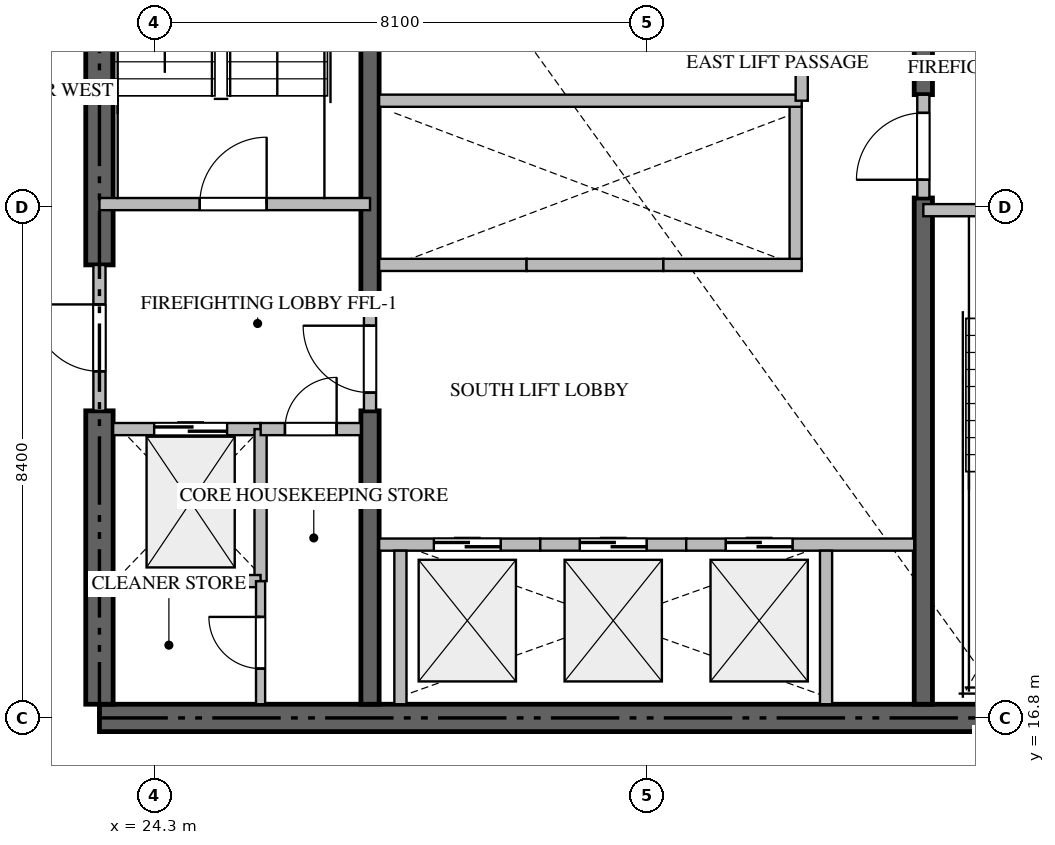
"""IFC4 building model, lengths in metres.
Left out: names, types, materials, properties, quantities, classifications, styles, units other than length and angle.
Written with IfcOpenShell. Run it as: python <this file> out.ifc"""

import sys

from ifc_helpers import new_model, si_unit, direction, frame, frame_2d, origin, place, context, subcontext, project, spatial, rectangle, extrude, source, transform, mapped, element, fill, save


model = new_model("IFC4")
c1 = context("Model", 3, precision=1e-05, world=origin(), true_north=direction((0.0, 1.0)))
c2 = subcontext(c1, "Body", "Model", "MODEL_VIEW")
j1 = project(units=[si_unit("LENGTHUNIT", "METRE"), si_unit("PLANEANGLEUNIT", "RADIAN")], contexts=[c1])
p1 = place(None, origin())
s1 = spatial("IfcSite", under=j1, at=p1, CompositionType="ELEMENT")
p2 = place(p1, origin())
s2 = spatial("IfcBuilding", under=s1, at=p2, CompositionType="ELEMENT")
p3 = place(p2, frame((0.0, 0.0, 67.95)))
s3 = spatial("IfcBuildingStorey", under=s2, at=p3, CompositionType="ELEMENT", Elevation=67.95)
p4 = place(p3, frame((23.4, 16.8, -0.26), z_axis=(0.0, 0.0, 1.0), x_axis=(1.0, 0.0, 0.0)))
e1 = element("IfcWall", 1, at=p4, inside=s3, PredefinedType="SHEAR", context=c2, shape_type="SweptSolid", body=[
    extrude(rectangle(XDim=18.0, YDim=0.45, at=frame_2d((9.0, 0.0))), origin(), (0.0, 0.0, 1.0), 3.748),
])
p5 = place(p3, frame((23.4, 17.025, -0.26), z_axis=(0.0, 0.0, 1.0), x_axis=(0.0, 1.0, 0.0)))
e2 = element("IfcWall", 2, at=p5, inside=s3, PredefinedType="SHEAR", context=c2, shape_type="SweptSolid", body=[
    extrude(rectangle(XDim=4.825, YDim=0.45, at=frame_2d((2.413, 0.0))), origin(), (0.0, 0.0, 1.0), 3.748),
])
p6 = place(p3, frame((23.4, 24.25, -0.26), z_axis=(0.0, 0.0, 1.0), x_axis=(0.0, 1.0, 0.0)))
e3 = element("IfcWall", 3, at=p6, inside=s3, PredefinedType="SHEAR", context=c2, shape_type="SweptSolid", body=[
    extrude(rectangle(XDim=9.125, YDim=0.45, at=frame_2d((4.562, 0.0))), origin(), (0.0, 0.0, 1.0), 3.748),
])
p7 = place(p3, frame((27.85, 17.025, -0.26), z_axis=(0.0, 0.0, 1.0), x_axis=(0.0, 1.0, 0.0)))
e4 = element("IfcWall", 4, at=p7, inside=s3, PredefinedType="SHEAR", context=c2, shape_type="SweptSolid", body=[
    extrude(rectangle(XDim=4.825, YDim=0.3, at=frame_2d((2.413, 0.0))), origin(), (0.0, 0.0, 1.0), 3.748),
])
p8 = place(p3, frame((27.85, 23.55, -0.26), z_axis=(0.0, 0.0, 1.0), x_axis=(0.0, 1.0, 0.0)))
e5 = element("IfcWall", 5, at=p8, inside=s3, PredefinedType="SHEAR", context=c2, shape_type="SweptSolid", body=[
    extrude(rectangle(XDim=9.825, YDim=0.3, at=frame_2d((4.913, 0.0))), origin(), (0.0, 0.0, 1.0), 3.748),
])
p9 = place(p3, frame((36.95, 17.025, -0.26), z_axis=(0.0, 0.0, 1.0), x_axis=(0.0, 1.0, 0.0)))
e6 = element("IfcWall", 6, at=p9, inside=s3, PredefinedType="SHEAR", context=c2, shape_type="SweptSolid", body=[
    extrude(rectangle(XDim=8.325, YDim=0.3, at=frame_2d((4.163, 0.0))), origin(), (0.0, 0.0, 1.0), 3.748),
])
p10 = place(p3, frame((36.95, 27.05, -0.26), z_axis=(0.0, 0.0, 1.0), x_axis=(0.0, 1.0, 0.0)))
e7 = element("IfcWall", 7, at=p10, inside=s3, PredefinedType="SHEAR", context=c2, shape_type="SweptSolid", body=[
    extrude(rectangle(XDim=6.325, YDim=0.3, at=frame_2d((3.163, 0.0))), origin(), (0.0, 0.0, 1.0), 3.748),
])
p11 = place(p3, frame((23.4, 25.25, 0.0), z_axis=(0.0, 0.0, 1.0), x_axis=(1.0, 0.0, 0.0)))
e8 = element("IfcWall", 8, at=p11, inside=s3, PredefinedType="STANDARD", context=c2, shape_type="SweptSolid", body=[
    extrude(rectangle(XDim=4.45, YDim=0.2, at=frame_2d((2.225, 0.0))), origin(), (0.0, 0.0, 1.0), 3.49),
])
p12 = place(p11, frame((1.65, 0.0, 0.0)))
e9 = element("IfcOpeningElement", 9, at=p12, cuts=e8, PredefinedType="OPENING", context=c2, shape_type="SweptSolid", body=[
    extrude(rectangle(XDim=1.1, YDim=2.15, at=frame_2d((0.55, 1.075))), frame((0.0, 0.11, 0.0), z_axis=(0.0, -1.0, 0.0), x_axis=(1.0, 0.0, 0.0)), (0.0, 0.0, 1.0), 0.22),
])
p13 = place(p3, frame((36.95, 25.15, 0.0), z_axis=(0.0, 0.0, 1.0), x_axis=(1.0, 0.0, 0.0)))
e10 = element("IfcWall", 10, at=p13, inside=s3, PredefinedType="STANDARD", context=c2, shape_type="SweptSolid", body=[
    extrude(rectangle(XDim=4.45, YDim=0.2, at=frame_2d((2.225, 0.0))), origin(), (0.0, 0.0, 1.0), 3.49),
])
p14 = place(p13, frame((1.65, 0.0, 0.0)))
e11 = element("IfcOpeningElement", 11, at=p14, cuts=e10, PredefinedType="OPENING", context=c2, shape_type="SweptSolid", body=[
    extrude(rectangle(XDim=1.1, YDim=2.15, at=frame_2d((0.55, 1.075))), frame((0.0, 0.11, 0.0), z_axis=(0.0, -1.0, 0.0), x_axis=(1.0, 0.0, 0.0)), (0.0, 0.0, 1.0), 0.22),
])
p15 = place(p3, frame((23.625, 21.55, 0.0), z_axis=(0.0, 0.0, 1.0), x_axis=(1.0, 0.0, 0.0)))
e12 = element("IfcWall", 12, at=p15, inside=s3, PredefinedType="STANDARD", context=c2, shape_type="SweptSolid", body=[
    extrude(rectangle(XDim=2.425, YDim=0.2, at=frame_2d((1.212, 0.0))), origin(), (0.0, 0.0, 1.0), 3.49),
])
p16 = place(p15, frame((0.675, 0.0, 0.0)))
e13 = element("IfcOpeningElement", 13, at=p16, cuts=e12, PredefinedType="OPENING", context=c2, shape_type="SweptSolid", body=[
    extrude(rectangle(XDim=1.2, YDim=2.2, at=frame_2d((0.6, 1.1))), frame((0.0, 0.11, 0.0), z_axis=(0.0, -1.0, 0.0), x_axis=(1.0, 0.0, 0.0)), (0.0, 0.0, 1.0), 0.22),
])
p17 = place(p3, frame((28.0, 19.65, 0.0), z_axis=(0.0, 0.0, 1.0), x_axis=(1.0, 0.0, 0.0)))
e14 = element("IfcWall", 14, at=p17, inside=s3, PredefinedType="STANDARD", context=c2, shape_type="SweptSolid", body=[
    extrude(rectangle(XDim=2.65, YDim=0.2, at=frame_2d((1.325, 0.0))), origin(), (0.0, 0.0, 1.0), 3.49),
])
p18 = place(p17, frame((0.9, 0.0, 0.0)))
e15 = element("IfcOpeningElement", 15, at=p18, cuts=e14, PredefinedType="OPENING", context=c2, shape_type="SweptSolid", body=[
    extrude(rectangle(XDim=1.1, YDim=2.2, at=frame_2d((0.55, 1.1))), frame((0.0, 0.11, 0.0), z_axis=(0.0, -1.0, 0.0), x_axis=(1.0, 0.0, 0.0)), (0.0, 0.0, 1.0), 0.22),
])
p19 = place(p3, frame((28.35, 17.025, 0.0), z_axis=(0.0, 0.0, 1.0), x_axis=(0.0, 1.0, 0.0)))
e16 = element("IfcWall", 16, at=p19, inside=s3, PredefinedType="STANDARD", context=c2, shape_type="SweptSolid", body=[
    extrude(rectangle(XDim=2.525, YDim=0.2, at=frame_2d((1.263, 0.0))), origin(), (0.0, 0.0, 1.0), 3.49),
])
p20 = place(p3, frame((30.65, 19.65, 0.0), z_axis=(0.0, 0.0, 1.0), x_axis=(1.0, 0.0, 0.0)))
e17 = element("IfcWall", 17, at=p20, inside=s3, PredefinedType="STANDARD", context=c2, shape_type="SweptSolid", body=[
    extrude(rectangle(XDim=2.4, YDim=0.2, at=frame_2d((1.2, 0.0))), origin(), (0.0, 0.0, 1.0), 3.49),
])
p21 = place(p20, frame((0.65, 0.0, 0.0)))
e18 = element("IfcOpeningElement", 18, at=p21, cuts=e17, PredefinedType="OPENING", context=c2, shape_type="SweptSolid", body=[
    extrude(rectangle(XDim=1.1, YDim=2.2, at=frame_2d((0.55, 1.1))), frame((0.0, 0.11, 0.0), z_axis=(0.0, -1.0, 0.0), x_axis=(1.0, 0.0, 0.0)), (0.0, 0.0, 1.0), 0.22),
])
p22 = place(p3, frame((33.05, 19.65, 0.0), z_axis=(0.0, 0.0, 1.0), x_axis=(1.0, 0.0, 0.0)))
e19 = element("IfcWall", 19, at=p22, inside=s3, PredefinedType="STANDARD", context=c2, shape_type="SweptSolid", body=[
    extrude(rectangle(XDim=3.75, YDim=0.2, at=frame_2d((1.875, 0.0))), origin(), (0.0, 0.0, 1.0), 3.49),
])
p23 = place(p22, frame((0.65, 0.0, 0.0)))
e20 = element("IfcOpeningElement", 20, at=p23, cuts=e19, PredefinedType="OPENING", context=c2, shape_type="SweptSolid", body=[
    extrude(rectangle(XDim=1.1, YDim=2.2, at=frame_2d((0.55, 1.1))), frame((0.0, 0.11, 0.0), z_axis=(0.0, -1.0, 0.0), x_axis=(1.0, 0.0, 0.0)), (0.0, 0.0, 1.0), 0.22),
])
p24 = place(p3, frame((35.35, 17.025, 0.0), z_axis=(0.0, 0.0, 1.0), x_axis=(0.0, 1.0, 0.0)))
e21 = element("IfcWall", 21, at=p24, inside=s3, PredefinedType="STANDARD", context=c2, shape_type="SweptSolid", body=[
    extrude(rectangle(XDim=2.525, YDim=0.2, at=frame_2d((1.263, 0.0))), origin(), (0.0, 0.0, 1.0), 3.49),
])
p25 = place(p3, frame((28.0, 24.25, 0.0), z_axis=(0.0, 0.0, 1.0), x_axis=(1.0, 0.0, 0.0)))
e22 = element("IfcWall", 22, at=p25, inside=s3, PredefinedType="STANDARD", context=c2, shape_type="SweptSolid", body=[
    extrude(rectangle(XDim=2.425, YDim=0.2, at=frame_2d((1.212, 0.0))), origin(), (0.0, 0.0, 1.0), 3.49),
])
p26 = place(p3, frame((30.425, 24.25, 0.0), z_axis=(0.0, 0.0, 1.0), x_axis=(1.0, 0.0, 0.0)))
e23 = element("IfcWall", 23, at=p26, inside=s3, PredefinedType="STANDARD", context=c2, shape_type="SweptSolid", body=[
    extrude(rectangle(XDim=2.25, YDim=0.2, at=frame_2d((1.125, 0.0))), origin(), (0.0, 0.0, 1.0), 3.49),
])
p27 = place(p3, frame((32.675, 24.25, 0.0), z_axis=(0.0, 0.0, 1.0), x_axis=(1.0, 0.0, 0.0)))
e24 = element("IfcWall", 24, at=p27, inside=s3, PredefinedType="STANDARD", context=c2, shape_type="SweptSolid", body=[
    extrude(rectangle(XDim=2.275, YDim=0.2, at=frame_2d((1.137, 0.0))), origin(), (0.0, 0.0, 1.0), 3.49),
])
for number, where, z_axis, x_axis in (
    (25, (34.85, 24.35, 0.0), (0.0, 0.0, 1.0), (0.0, 1.0, 0.0)),
    (26, (26.05, 19.05, 0.0), (0.0, 0.0, 1.0), (0.0, 1.0, 0.0)),
):
    element("IfcWall", number, at=place(p3, frame(where, z_axis=z_axis, x_axis=x_axis)), inside=s3, PredefinedType="STANDARD", context=c2, shape_type="SweptSolid", body=[
        extrude(rectangle(XDim=2.5, YDim=0.2, at=frame_2d((1.25, 0.0))), origin(), (0.0, 0.0, 1.0), 3.49),
    ])
p28 = place(p3, frame((23.625, 19.05, 0.0), z_axis=(0.0, 0.0, 1.0), x_axis=(1.0, 0.0, 0.0)))
e27 = element("IfcWall", 27, at=p28, inside=s3, PredefinedType="STANDARD", context=c2, shape_type="SweptSolid", body=[
    extrude(rectangle(XDim=2.425, YDim=0.2, at=frame_2d((1.212, 0.0))), origin(), (0.0, 0.0, 1.0), 3.49),
])
p29 = place(p3, frame((26.052, 21.55, 0.0), z_axis=(0.0, 0.0, 1.0), x_axis=(1.0, 0.0, 0.0)))
e28 = element("IfcWall", 28, at=p29, inside=s3, PredefinedType="STANDARD", context=c2, shape_type="SweptSolid", body=[
    extrude(rectangle(XDim=1.648, YDim=0.2, at=frame_2d((0.824, 0.0))), origin(), (0.0, 0.0, 1.0), 3.49),
])
p30 = place(p29, frame((0.399, 0.0, 0.0)))
e29 = element("IfcOpeningElement", 29, at=p30, cuts=e28, PredefinedType="OPENING", context=c2, shape_type="SweptSolid", body=[
    extrude(rectangle(XDim=0.85, YDim=2.1, at=frame_2d((0.425, 1.05))), frame((0.0, 0.11, 0.0), z_axis=(0.0, -1.0, 0.0), x_axis=(1.0, 0.0, 0.0)), (0.0, 0.0, 1.0), 0.22),
])
p31 = place(p3, frame((23.4, 21.852, 0.0), z_axis=(0.0, 0.0, 1.0), x_axis=(0.0, 1.0, 0.0)))
e30 = element("IfcWall", 30, at=p31, inside=s3, PredefinedType="STANDARD", context=c2, shape_type="SweptSolid", body=[
    extrude(rectangle(XDim=2.396, YDim=0.2, at=frame_2d((1.198, 0.0))), origin(), (0.0, 0.0, 1.0), 3.49),
])
p32 = place(p31, frame((0.648, 0.0, 0.0)))
e31 = element("IfcOpeningElement", 31, at=p32, cuts=e30, PredefinedType="OPENING", context=c2, shape_type="SweptSolid", body=[
    extrude(rectangle(XDim=1.1, YDim=2.15, at=frame_2d((0.55, 1.075))), frame((0.0, 0.11, 0.0), z_axis=(0.0, -1.0, 0.0), x_axis=(1.0, 0.0, 0.0)), (0.0, 0.0, 1.0), 0.22),
])
p33 = place(p3, frame((27.85, 21.852, 0.0), z_axis=(0.0, 0.0, 1.0), x_axis=(0.0, 1.0, 0.0)))
e32 = element("IfcWall", 32, at=p33, inside=s3, PredefinedType="STANDARD", context=c2, shape_type="SweptSolid", body=[
    extrude(rectangle(XDim=1.696, YDim=0.2, at=frame_2d((0.848, 0.0))), origin(), (0.0, 0.0, 1.0), 3.49),
])
p34 = place(p33, frame((0.298, 0.0, 0.0)))
e33 = element("IfcOpeningElement", 33, at=p34, cuts=e32, PredefinedType="OPENING", context=c2, shape_type="SweptSolid", body=[
    extrude(rectangle(XDim=1.1, YDim=2.15, at=frame_2d((0.55, 1.075))), frame((0.0, 0.11, 0.0), z_axis=(0.0, -1.0, 0.0), x_axis=(1.0, 0.0, 0.0)), (0.0, 0.0, 1.0), 0.22),
])
p35 = place(p3, frame((36.95, 25.352, 0.0), z_axis=(0.0, 0.0, 1.0), x_axis=(0.0, 1.0, 0.0)))
e34 = element("IfcWall", 34, at=p35, inside=s3, PredefinedType="STANDARD", context=c2, shape_type="SweptSolid", body=[
    extrude(rectangle(XDim=1.696, YDim=0.2, at=frame_2d((0.848, 0.0))), origin(), (0.0, 0.0, 1.0), 3.49),
])
p36 = place(p35, frame((0.298, 0.0, 0.0)))
e35 = element("IfcOpeningElement", 35, at=p36, cuts=e34, PredefinedType="OPENING", context=c2, shape_type="SweptSolid", body=[
    extrude(rectangle(XDim=1.1, YDim=2.15, at=frame_2d((0.55, 1.075))), frame((0.0, 0.11, 0.0), z_axis=(0.0, -1.0, 0.0), x_axis=(1.0, 0.0, 0.0)), (0.0, 0.0, 1.0), 0.22),
])
p37 = place(p3, frame((28.0, 26.95, 0.0), z_axis=(0.0, 0.0, 1.0), x_axis=(1.0, 0.0, 0.0)))
e36 = element("IfcWall", 36, at=p37, inside=s3, PredefinedType="STANDARD", context=c2, shape_type="SweptSolid", body=[
    extrude(rectangle(XDim=6.95, YDim=0.2, at=frame_2d((3.475, 0.0))), origin(), (0.0, 0.0, 1.0), 3.49),
])
p38 = place(p3, frame((26.05, 17.025, 0.0), z_axis=(0.0, 0.0, 1.0), x_axis=(0.0, 1.0, 0.0)))
e37 = element("IfcWall", 37, at=p38, inside=s3, PredefinedType="PARTITIONING", context=c2, shape_type="SweptSolid", body=[
    extrude(rectangle(XDim=2.023, YDim=0.15, at=frame_2d((1.012, 0.0))), origin(), (0.0, 0.0, 1.0), 3.49),
])
p39 = place(p38, frame((0.586, 0.0, 0.0)))
e38 = element("IfcOpeningElement", 38, at=p39, cuts=e37, PredefinedType="OPENING", context=c2, shape_type="SweptSolid", body=[
    extrude(rectangle(XDim=0.85, YDim=2.1, at=frame_2d((0.425, 1.05))), frame((0.0, 0.085, 0.0), z_axis=(0.0, -1.0, 0.0), x_axis=(1.0, 0.0, 0.0)), (0.0, 0.0, 1.0), 0.17),
])
p40 = place(p3, frame((34.95, 26.95, 0.0), z_axis=(0.0, 0.0, 1.0), x_axis=(0.0, 1.0, 0.0)))
e39 = element("IfcWall", 39, at=p40, inside=s3, PredefinedType="STANDARD", context=c2, shape_type="SweptSolid", body=[
    extrude(rectangle(XDim=3.6, YDim=0.2, at=frame_2d((1.8, 0.0))), origin(), (0.0, 0.0, 1.0), 3.49),
])
p41 = place(p40, frame((1.35, 0.0, 0.0)))
e40 = element("IfcOpeningElement", 40, at=p41, cuts=e39, PredefinedType="OPENING", context=c2, shape_type="SweptSolid", body=[
    extrude(rectangle(XDim=0.9, YDim=2.1, at=frame_2d((0.45, 1.05))), frame((0.0, 0.11, 0.0), z_axis=(0.0, -1.0, 0.0), x_axis=(1.0, 0.0, 0.0)), (0.0, 0.0, 1.0), 0.22),
])
m1 = source(origin(), c2, "Body", "SweptSolid", [
    extrude(rectangle(XDim=1.1, YDim=2.15, at=frame_2d((0.55, 1.075))), frame((0.0, 0.025, 0.0), z_axis=(0.0, -1.0, 0.0), x_axis=(1.0, 0.0, 0.0)), (0.0, 0.0, 1.0), 0.05),
])
p42 = place(p12, origin())
e41 = element("IfcDoor", 41, at=p42, inside=s3, OperationType="SINGLE_SWING_RIGHT", PredefinedType="DOOR", context=c2, shape_type="MappedRepresentation", body=[
    mapped(m1, transform((0.0, 0.0, 0.0), scale=1.0)),
])
fill(e9, e41)
m2 = source(origin(), c2, "Body", "SweptSolid", [
    extrude(rectangle(XDim=1.2, YDim=2.2, at=frame_2d((0.6, 1.1))), frame((0.0, 0.025, 0.0), z_axis=(0.0, -1.0, 0.0), x_axis=(1.0, 0.0, 0.0)), (0.0, 0.0, 1.0), 0.05),
])
p43 = place(p16, origin())
e42 = element("IfcDoor", 42, at=p43, inside=s3, OperationType="DOUBLE_DOOR_SLIDING", PredefinedType="DOOR", context=c2, shape_type="MappedRepresentation", body=[
    mapped(m2, transform((0.0, 0.0, 0.0), scale=1.0)),
])
fill(e13, e42)
m3 = source(origin(), c2, "Body", "SweptSolid", [
    extrude(rectangle(XDim=1.1, YDim=2.2, at=frame_2d((0.55, 1.1))), frame((0.0, 0.025, 0.0), z_axis=(0.0, -1.0, 0.0), x_axis=(1.0, 0.0, 0.0)), (0.0, 0.0, 1.0), 0.05),
])
p44 = place(p18, origin())
e43 = element("IfcDoor", 43, at=p44, inside=s3, OperationType="DOUBLE_DOOR_SLIDING", PredefinedType="DOOR", context=c2, shape_type="MappedRepresentation", body=[
    mapped(m3, transform((0.0, 0.0, 0.0), scale=1.0)),
])
fill(e15, e43)
p45 = place(p21, origin())
e44 = element("IfcDoor", 44, at=p45, inside=s3, OperationType="DOUBLE_DOOR_SLIDING", PredefinedType="DOOR", context=c2, shape_type="MappedRepresentation", body=[
    mapped(m3, transform((0.0, 0.0, 0.0), scale=1.0)),
])
fill(e18, e44)
p46 = place(p23, origin())
e45 = element("IfcDoor", 45, at=p46, inside=s3, OperationType="DOUBLE_DOOR_SLIDING", PredefinedType="DOOR", context=c2, shape_type="MappedRepresentation", body=[
    mapped(m3, transform((0.0, 0.0, 0.0), scale=1.0)),
])
fill(e20, e45)
m4 = source(origin(), c2, "Body", "SweptSolid", [
    extrude(rectangle(XDim=0.85, YDim=2.1, at=frame_2d((0.425, 1.05))), frame((0.0, 0.025, 0.0), z_axis=(0.0, -1.0, 0.0), x_axis=(1.0, 0.0, 0.0)), (0.0, 0.0, 1.0), 0.05),
])
p47 = place(p30, origin())
e46 = element("IfcDoor", 46, at=p47, inside=s3, OperationType="SINGLE_SWING_RIGHT", PredefinedType="DOOR", context=c2, shape_type="MappedRepresentation", body=[
    mapped(m4, transform((0.0, 0.0, 0.0), scale=1.0)),
])
fill(e29, e46)
p48 = place(p32, origin())
e47 = element("IfcDoor", 47, at=p48, inside=s3, OperationType="SINGLE_SWING_RIGHT", PredefinedType="DOOR", context=c2, shape_type="MappedRepresentation", body=[
    mapped(m1, transform((0.0, 0.0, 0.0), scale=1.0)),
])
fill(e31, e47)
p49 = place(p34, origin())
e48 = element("IfcDoor", 48, at=p49, inside=s3, OperationType="SINGLE_SWING_RIGHT", PredefinedType="DOOR", context=c2, shape_type="MappedRepresentation", body=[
    mapped(m1, transform((0.0, 0.0, 0.0), scale=1.0)),
])
fill(e33, e48)
p50 = place(p36, origin())
e49 = element("IfcDoor", 49, at=p50, inside=s3, OperationType="SINGLE_SWING_LEFT", PredefinedType="DOOR", context=c2, shape_type="MappedRepresentation", body=[
    mapped(m1, transform((0.0, 0.0, 0.0), scale=1.0)),
])
fill(e35, e49)
p51 = place(p39, origin())
e50 = element("IfcDoor", 50, at=p51, inside=s3, OperationType="SINGLE_SWING_RIGHT", PredefinedType="DOOR", context=c2, shape_type="MappedRepresentation", body=[
    mapped(m4, transform((0.0, 0.0, 0.0), scale=1.0)),
])
fill(e38, e50)
save(model, sys.argv[1])
